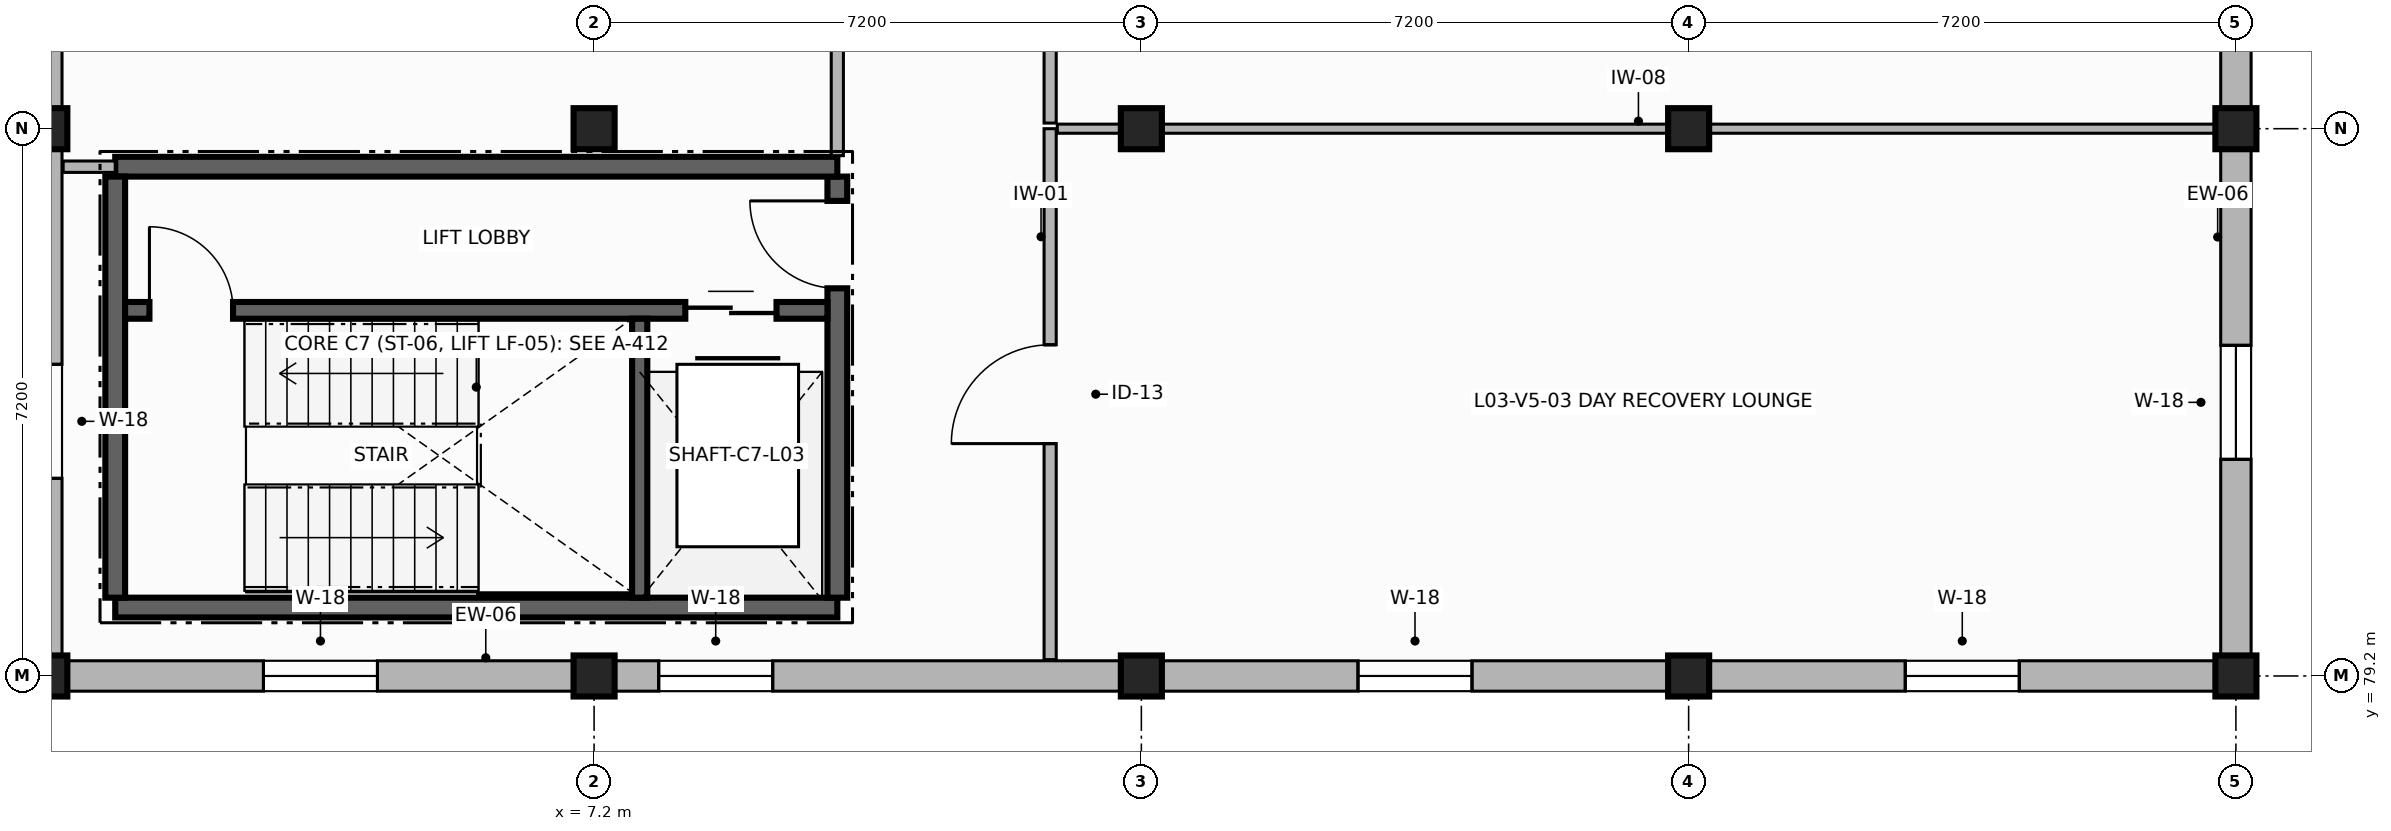
"""IFC4 building model, lengths in metres.
Left out: names, types, materials, properties, quantities, classifications, styles, units other than length and angle.
Written with IfcOpenShell. Run it as: python <this file> out.ifc"""

import sys

from ifc_helpers import new_model, si_unit, direction, frame, frame_2d, origin, origin_2d, place, context, subcontext, project, spatial, rectangle, extrude, element, fill, save


model = new_model("IFC4")
c1 = context("Model", 3, precision=1e-05, world=origin(), true_north=direction((0.0, 1.0)))
c2 = subcontext(c1, "Body", "Model", "MODEL_VIEW")
j1 = project(units=[si_unit("LENGTHUNIT", "METRE"), si_unit("PLANEANGLEUNIT", "RADIAN")], contexts=[c1])
p1 = place(None, origin())
s1 = spatial("IfcSite", under=j1, at=p1, CompositionType="ELEMENT")
p2 = place(p1, origin())
s2 = spatial("IfcBuilding", under=s1, at=p2, CompositionType="ELEMENT")
p3 = place(p2, frame((0.0, 0.0, 12.3)))
s3 = spatial("IfcBuildingStorey", under=s2, at=p3, CompositionType="ELEMENT", Elevation=12.3)
for number, where, z_axis, x_axis in (
    (1, (0.0, 79.2, 0.0), (0.0, 0.0, 1.0), (1.0, 0.0, 0.0)),
    (2, (0.0, 86.4, 0.0), (0.0, 0.0, 1.0), (1.0, 0.0, 0.0)),
    (3, (7.2, 79.2, 0.0), (0.0, 0.0, 1.0), (1.0, 0.0, 0.0)),
    (4, (7.2, 86.4, 0.0), (0.0, 0.0, 1.0), (1.0, 0.0, 0.0)),
    (5, (14.4, 79.2, 0.0), (0.0, 0.0, 1.0), (1.0, 0.0, 0.0)),
    (6, (14.4, 86.4, 0.0), (0.0, 0.0, 1.0), (1.0, 0.0, 0.0)),
    (7, (21.6, 79.2, 0.0), (0.0, 0.0, 1.0), (1.0, 0.0, 0.0)),
    (8, (21.6, 86.4, 0.0), (0.0, 0.0, 1.0), (1.0, 0.0, 0.0)),
    (9, (28.8, 79.2, 0.0), (0.0, 0.0, 1.0), (1.0, 0.0, 0.0)),
    (10, (28.8, 86.4, 0.0), (0.0, 0.0, 1.0), (1.0, 0.0, 0.0)),
):
    element("IfcColumn", number, at=place(p3, frame(where, z_axis=z_axis, x_axis=x_axis)), inside=s3, PredefinedType="COLUMN", context=c2, shape_type="SweptSolid", body=[
        extrude(rectangle(XDim=0.54, YDim=0.54, at=origin_2d()), origin(), (0.0, 0.0, 1.0), 3.39),
    ])
p4 = place(p3, frame((0.0, 79.2, 0.0), z_axis=(0.0, 0.0, 1.0), x_axis=(1.0, 0.0, 0.0)))
e11 = element("IfcWall", 11, at=p4, inside=s3, PredefinedType="SOLIDWALL", context=c2, shape_type="SweptSolid", body=[
    extrude(rectangle(XDim=7.2, YDim=0.4, at=frame_2d((3.6, 0.0))), origin(), (0.0, 0.0, 1.0), 2.72),
])
p5 = place(p4, frame((2.85, 0.0, 0.9)))
e12 = element("IfcOpeningElement", 12, at=p5, cuts=e11, PredefinedType="OPENING", context=c2, shape_type="SweptSolid", body=[
    extrude(rectangle(XDim=1.5, YDim=1.6, at=frame_2d((0.75, 0.8))), frame((0.0, 0.21, 0.0), z_axis=(0.0, -1.0, 0.0), x_axis=(1.0, 0.0, 0.0)), (0.0, 0.0, 1.0), 0.42),
])
p6 = place(p3, frame((7.2, 79.2, 0.0), z_axis=(0.0, 0.0, 1.0), x_axis=(1.0, 0.0, 0.0)))
e13 = element("IfcWall", 13, at=p6, inside=s3, PredefinedType="SOLIDWALL", context=c2, shape_type="SweptSolid", body=[
    extrude(rectangle(XDim=7.2, YDim=0.4, at=frame_2d((3.6, 0.0))), origin(), (0.0, 0.0, 1.0), 2.72),
])
p7 = place(p6, frame((0.85, 0.0, 0.9)))
e14 = element("IfcOpeningElement", 14, at=p7, cuts=e13, PredefinedType="OPENING", context=c2, shape_type="SweptSolid", body=[
    extrude(rectangle(XDim=1.5, YDim=1.6, at=frame_2d((0.75, 0.8))), frame((0.0, 0.21, 0.0), z_axis=(0.0, -1.0, 0.0), x_axis=(1.0, 0.0, 0.0)), (0.0, 0.0, 1.0), 0.42),
])
p8 = place(p3, frame((14.4, 79.2, 0.0), z_axis=(0.0, 0.0, 1.0), x_axis=(1.0, 0.0, 0.0)))
e15 = element("IfcWall", 15, at=p8, inside=s3, PredefinedType="SOLIDWALL", context=c2, shape_type="SweptSolid", body=[
    extrude(rectangle(XDim=7.2, YDim=0.4, at=frame_2d((3.6, 0.0))), origin(), (0.0, 0.0, 1.0), 2.72),
])
p9 = place(p8, frame((2.85, 0.0, 0.9)))
e16 = element("IfcOpeningElement", 16, at=p9, cuts=e15, PredefinedType="OPENING", context=c2, shape_type="SweptSolid", body=[
    extrude(rectangle(XDim=1.5, YDim=1.6, at=frame_2d((0.75, 0.8))), frame((0.0, 0.21, 0.0), z_axis=(0.0, -1.0, 0.0), x_axis=(1.0, 0.0, 0.0)), (0.0, 0.0, 1.0), 0.42),
])
p10 = place(p3, frame((21.6, 79.2, 0.0), z_axis=(0.0, 0.0, 1.0), x_axis=(1.0, 0.0, 0.0)))
e17 = element("IfcWall", 17, at=p10, inside=s3, PredefinedType="SOLIDWALL", context=c2, shape_type="SweptSolid", body=[
    extrude(rectangle(XDim=7.2, YDim=0.4, at=frame_2d((3.6, 0.0))), origin(), (0.0, 0.0, 1.0), 2.72),
])
p11 = place(p10, frame((2.85, 0.0, 0.9)))
e18 = element("IfcOpeningElement", 18, at=p11, cuts=e17, PredefinedType="OPENING", context=c2, shape_type="SweptSolid", body=[
    extrude(rectangle(XDim=1.5, YDim=1.6, at=frame_2d((0.75, 0.8))), frame((0.0, 0.21, 0.0), z_axis=(0.0, -1.0, 0.0), x_axis=(1.0, 0.0, 0.0)), (0.0, 0.0, 1.0), 0.42),
])
p12 = place(p3, frame((28.8, 79.2, 0.0), z_axis=(0.0, 0.0, 1.0), x_axis=(0.0, 1.0, 0.0)))
e19 = element("IfcWall", 19, at=p12, inside=s3, PredefinedType="SOLIDWALL", context=c2, shape_type="SweptSolid", body=[
    extrude(rectangle(XDim=7.2, YDim=0.4, at=frame_2d((3.6, 0.0))), origin(), (0.0, 0.0, 1.0), 2.72),
])
p13 = place(p12, frame((2.85, 0.0, 0.9)))
e20 = element("IfcOpeningElement", 20, at=p13, cuts=e19, PredefinedType="OPENING", context=c2, shape_type="SweptSolid", body=[
    extrude(rectangle(XDim=1.5, YDim=1.6, at=frame_2d((0.75, 0.8))), frame((0.0, 0.21, 0.0), z_axis=(0.0, -1.0, 0.0), x_axis=(1.0, 0.0, 0.0)), (0.0, 0.0, 1.0), 0.42),
])
p14 = place(p3, frame((28.8, 86.4, 0.0), z_axis=(0.0, 0.0, 1.0), x_axis=(0.0, 1.0, 0.0)))
e21 = element("IfcWall", 21, at=p14, inside=s3, PredefinedType="SOLIDWALL", context=c2, shape_type="SweptSolid", body=[
    extrude(rectangle(XDim=7.2, YDim=0.4, at=frame_2d((3.6, 0.0))), origin(), (0.0, 0.0, 1.0), 2.72),
])
p15 = place(p14, frame((2.85, 0.0, 0.9)))
e22 = element("IfcOpeningElement", 22, at=p15, cuts=e21, PredefinedType="OPENING", context=c2, shape_type="SweptSolid", body=[
    extrude(rectangle(XDim=1.5, YDim=1.6, at=frame_2d((0.75, 0.8))), frame((0.0, 0.21, 0.0), z_axis=(0.0, -1.0, 0.0), x_axis=(1.0, 0.0, 0.0)), (0.0, 0.0, 1.0), 0.42),
])
p16 = place(p3, frame((0.0, 93.6, 0.0), z_axis=(0.0, 0.0, 1.0), x_axis=(0.0, -1.0, 0.0)))
e23 = element("IfcWall", 23, at=p16, inside=s3, PredefinedType="SOLIDWALL", context=c2, shape_type="SweptSolid", body=[
    extrude(rectangle(XDim=7.2, YDim=0.4, at=frame_2d((3.6, 0.0))), origin(), (0.0, 0.0, 1.0), 2.72),
])
p17 = place(p16, frame((2.85, 0.0, 0.9)))
e24 = element("IfcOpeningElement", 24, at=p17, cuts=e23, PredefinedType="OPENING", context=c2, shape_type="SweptSolid", body=[
    extrude(rectangle(XDim=1.5, YDim=1.6, at=frame_2d((0.75, 0.8))), frame((0.0, 0.21, 0.0), z_axis=(0.0, -1.0, 0.0), x_axis=(1.0, 0.0, 0.0)), (0.0, 0.0, 1.0), 0.42),
])
p18 = place(p3, frame((0.0, 86.4, 0.0), z_axis=(0.0, 0.0, 1.0), x_axis=(0.0, -1.0, 0.0)))
e25 = element("IfcWall", 25, at=p18, inside=s3, PredefinedType="SOLIDWALL", context=c2, shape_type="SweptSolid", body=[
    extrude(rectangle(XDim=7.2, YDim=0.4, at=frame_2d((3.6, 0.0))), origin(), (0.0, 0.0, 1.0), 2.72),
])
p19 = place(p18, frame((3.1, 0.0, 0.9)))
e26 = element("IfcOpeningElement", 26, at=p19, cuts=e25, PredefinedType="OPENING", context=c2, shape_type="SweptSolid", body=[
    extrude(rectangle(XDim=1.5, YDim=1.6, at=frame_2d((0.75, 0.8))), frame((0.0, 0.21, 0.0), z_axis=(0.0, -1.0, 0.0), x_axis=(1.0, 0.0, 0.0)), (0.0, 0.0, 1.0), 0.42),
])
p20 = place(p3, frame((0.9, 80.1, 0.0), z_axis=(0.0, 0.0, 1.0), x_axis=(1.0, 0.0, 0.0)))
e27 = element("IfcWall", 27, at=p20, inside=s3, PredefinedType="SHEAR", context=c2, shape_type="SweptSolid", body=[
    extrude(rectangle(XDim=9.5, YDim=0.26, at=frame_2d((4.75, 0.0))), origin(), (0.0, 0.0, 1.0), 3.39),
])
p21 = place(p3, frame((10.4, 80.23, 0.0), z_axis=(0.0, 0.0, 1.0), x_axis=(0.0, 1.0, 0.0)))
e28 = element("IfcWall", 28, at=p21, inside=s3, PredefinedType="SHEAR", context=c2, shape_type="SweptSolid", body=[
    extrude(rectangle(XDim=5.54, YDim=0.26, at=frame_2d((2.77, 0.0))), origin(), (0.0, 0.0, 1.0), 3.39),
])
p22 = place(p21, frame((4.07, 0.0, 0.0)))
e29 = element("IfcOpeningElement", 29, at=p22, cuts=e28, PredefinedType="OPENING", context=c2, shape_type="SweptSolid", body=[
    extrude(rectangle(XDim=1.15, YDim=2.2, at=frame_2d((0.575, 1.1))), frame((0.0, 0.14, 0.0), z_axis=(0.0, -1.0, 0.0), x_axis=(1.0, 0.0, 0.0)), (0.0, 0.0, 1.0), 0.28),
])
p23 = place(p3, frame((10.4, 85.9, 0.0), z_axis=(0.0, 0.0, 1.0), x_axis=(-1.0, 0.0, 0.0)))
e30 = element("IfcWall", 30, at=p23, inside=s3, PredefinedType="SHEAR", context=c2, shape_type="SweptSolid", body=[
    extrude(rectangle(XDim=9.5, YDim=0.26, at=frame_2d((4.75, 0.0))), origin(), (0.0, 0.0, 1.0), 3.39),
])
p24 = place(p3, frame((0.9, 85.77, 0.0), z_axis=(0.0, 0.0, 1.0), x_axis=(0.0, -1.0, 0.0)))
e31 = element("IfcWall", 31, at=p24, inside=s3, PredefinedType="SHEAR", context=c2, shape_type="SweptSolid", body=[
    extrude(rectangle(XDim=5.54, YDim=0.26, at=frame_2d((2.77, 0.0))), origin(), (0.0, 0.0, 1.0), 3.39),
])
p25 = place(p3, frame((1.03, 84.01, 0.0), z_axis=(0.0, 0.0, 1.0), x_axis=(1.0, 0.0, 0.0)))
e32 = element("IfcWall", 32, at=p25, inside=s3, PredefinedType="SHEAR", context=c2, shape_type="SweptSolid", body=[
    extrude(rectangle(XDim=9.24, YDim=0.22, at=frame_2d((4.62, 0.0))), origin(), (0.0, 0.0, 1.0), 3.39),
])
p26 = place(p25, frame((0.32, 0.0, 0.0)))
e33 = element("IfcOpeningElement", 33, at=p26, cuts=e32, PredefinedType="OPENING", context=c2, shape_type="SweptSolid", body=[
    extrude(rectangle(XDim=1.1, YDim=2.15, at=frame_2d((0.55, 1.075))), frame((0.0, 0.12, 0.0), z_axis=(0.0, -1.0, 0.0), x_axis=(1.0, 0.0, 0.0)), (0.0, 0.0, 1.0), 0.24),
])
p27 = place(p25, frame((7.37, 0.0, 0.0)))
e34 = element("IfcOpeningElement", 34, at=p27, cuts=e32, PredefinedType="OPENING", context=c2, shape_type="SweptSolid", body=[
    extrude(rectangle(XDim=1.2, YDim=2.2, at=frame_2d((0.6, 1.1))), frame((0.0, 0.12, 0.0), z_axis=(0.0, -1.0, 0.0), x_axis=(1.0, 0.0, 0.0)), (0.0, 0.0, 1.0), 0.24),
])
p28 = place(p3, frame((7.8, 80.23, 0.0), z_axis=(0.0, 0.0, 1.0), x_axis=(0.0, 1.0, 0.0)))
e35 = element("IfcWall", 35, at=p28, inside=s3, PredefinedType="SHEAR", context=c2, shape_type="SweptSolid", body=[
    extrude(rectangle(XDim=3.67, YDim=0.2, at=frame_2d((1.835, 0.0))), origin(), (0.0, 0.0, 1.0), 3.39),
])
p29 = place(p3, frame((10.4, 93.511, 0.0), z_axis=(0.0, 0.0, 1.0), x_axis=(0.0, -1.0, 0.0)))
e36 = element("IfcWall", 36, at=p29, inside=s3, PredefinedType="PARTITIONING", context=c2, shape_type="SweptSolid", body=[
    extrude(rectangle(XDim=7.466, YDim=0.16, at=frame_2d((3.733, 0.0))), origin(), (0.0, 0.0, 1.0), 2.7),
])
p30 = place(p29, frame((2.864, 0.0, 0.0)))
e37 = element("IfcOpeningElement", 37, at=p30, cuts=e36, PredefinedType="OPENING", context=c2, shape_type="SweptSolid", body=[
    extrude(rectangle(XDim=1.5, YDim=2.3, at=frame_2d((0.75, 1.15))), frame((0.0, 0.09, 0.0), z_axis=(0.0, -1.0, 0.0), x_axis=(1.0, 0.0, 0.0)), (0.0, 0.0, 1.0), 0.18),
])
p31 = place(p3, frame((0.9, 85.9, 0.0), z_axis=(0.0, 0.0, 1.0), x_axis=(-1.0, 0.0, 0.0)))
e38 = element("IfcWall", 38, at=p31, inside=s3, PredefinedType="PARTITIONING", context=c2, shape_type="SweptSolid", body=[
    extrude(rectangle(XDim=0.685, YDim=0.15, at=frame_2d((0.342, 0.0))), origin(), (0.0, 0.0, 1.0), 2.7),
])
p32 = place(p3, frame((13.2, 79.415, 0.0), z_axis=(0.0, 0.0, 1.0), x_axis=(0.0, 1.0, 0.0)))
e39 = element("IfcWall", 39, at=p32, inside=s3, PredefinedType="PARTITIONING", context=c2, shape_type="SweptSolid", body=[
    extrude(rectangle(XDim=6.985, YDim=0.16, at=frame_2d((3.492, 0.0))), origin(), (0.0, 0.0, 1.0), 2.7),
])
p33 = place(p32, frame((2.842, 0.0, 0.0)))
e40 = element("IfcOpeningElement", 40, at=p33, cuts=e39, PredefinedType="OPENING", context=c2, shape_type="SweptSolid", body=[
    extrude(rectangle(XDim=1.3, YDim=2.25, at=frame_2d((0.65, 1.125))), frame((0.0, 0.09, 0.0), z_axis=(0.0, -1.0, 0.0), x_axis=(1.0, 0.0, 0.0)), (0.0, 0.0, 1.0), 0.18),
])
p34 = place(p3, frame((13.294, 86.4, 0.0), z_axis=(0.0, 0.0, 1.0), x_axis=(1.0, 0.0, 0.0)))
e41 = element("IfcWall", 41, at=p34, inside=s3, PredefinedType="PARTITIONING", context=c2, shape_type="SweptSolid", body=[
    extrude(rectangle(XDim=15.291, YDim=0.12, at=frame_2d((7.646, 0.0))), origin(), (0.0, 0.0, 1.0), 2.7),
])
p35 = place(p3, frame((13.2, 86.474, 0.0), z_axis=(0.0, 0.0, 1.0), x_axis=(0.0, 1.0, 0.0)))
e42 = element("IfcWall", 42, at=p35, inside=s3, PredefinedType="PARTITIONING", context=c2, shape_type="SweptSolid", body=[
    extrude(rectangle(XDim=14.326, YDim=0.16, at=frame_2d((7.163, 0.0))), origin(), (0.0, 0.0, 1.0), 2.7),
])
p36 = place(p35, frame((2.903, 0.0, 0.0)))
e43 = element("IfcOpeningElement", 43, at=p36, cuts=e42, PredefinedType="OPENING", context=c2, shape_type="SweptSolid", body=[
    extrude(rectangle(XDim=1.25, YDim=2.2, at=frame_2d((0.625, 1.1))), frame((0.0, 0.09, 0.0), z_axis=(0.0, -1.0, 0.0), x_axis=(1.0, 0.0, 0.0)), (0.0, 0.0, 1.0), 0.18),
])
p37 = place(p5, origin())
e44 = element("IfcWindow", 44, at=p37, inside=s3, PartitioningType="SINGLE_PANEL", PredefinedType="WINDOW", context=c2, shape_type="SweptSolid", body=[
    extrude(rectangle(XDim=1.5, YDim=1.6, at=frame_2d((0.75, 0.8))), frame((0.0, 0.03, 0.0), z_axis=(0.0, -1.0, 0.0), x_axis=(1.0, 0.0, 0.0)), (0.0, 0.0, 1.0), 0.06),
])
fill(e12, e44)
p38 = place(p7, origin())
e45 = element("IfcWindow", 45, at=p38, inside=s3, PartitioningType="SINGLE_PANEL", PredefinedType="WINDOW", context=c2, shape_type="SweptSolid", body=[
    extrude(rectangle(XDim=1.5, YDim=1.6, at=frame_2d((0.75, 0.8))), frame((0.0, 0.03, 0.0), z_axis=(0.0, -1.0, 0.0), x_axis=(1.0, 0.0, 0.0)), (0.0, 0.0, 1.0), 0.06),
])
fill(e14, e45)
p39 = place(p9, origin())
e46 = element("IfcWindow", 46, at=p39, inside=s3, PartitioningType="SINGLE_PANEL", PredefinedType="WINDOW", context=c2, shape_type="SweptSolid", body=[
    extrude(rectangle(XDim=1.5, YDim=1.6, at=frame_2d((0.75, 0.8))), frame((0.0, 0.03, 0.0), z_axis=(0.0, -1.0, 0.0), x_axis=(1.0, 0.0, 0.0)), (0.0, 0.0, 1.0), 0.06),
])
fill(e16, e46)
p40 = place(p11, origin())
e47 = element("IfcWindow", 47, at=p40, inside=s3, PartitioningType="SINGLE_PANEL", PredefinedType="WINDOW", context=c2, shape_type="SweptSolid", body=[
    extrude(rectangle(XDim=1.5, YDim=1.6, at=frame_2d((0.75, 0.8))), frame((0.0, 0.03, 0.0), z_axis=(0.0, -1.0, 0.0), x_axis=(1.0, 0.0, 0.0)), (0.0, 0.0, 1.0), 0.06),
])
fill(e18, e47)
p41 = place(p13, origin())
e48 = element("IfcWindow", 48, at=p41, inside=s3, PartitioningType="SINGLE_PANEL", PredefinedType="WINDOW", context=c2, shape_type="SweptSolid", body=[
    extrude(rectangle(XDim=1.5, YDim=1.6, at=frame_2d((0.75, 0.8))), frame((0.0, 0.03, 0.0), z_axis=(0.0, -1.0, 0.0), x_axis=(1.0, 0.0, 0.0)), (0.0, 0.0, 1.0), 0.06),
])
fill(e20, e48)
p42 = place(p26, origin())
e49 = element("IfcDoor", 49, at=p42, inside=s3, OperationType="SINGLE_SWING_LEFT", PredefinedType="DOOR", context=c2, shape_type="SweptSolid", body=[
    extrude(rectangle(XDim=1.1, YDim=2.15, at=frame_2d((0.55, 1.075))), frame((0.0, 0.025, 0.0), z_axis=(0.0, -1.0, 0.0), x_axis=(1.0, 0.0, 0.0)), (0.0, 0.0, 1.0), 0.05),
])
fill(e33, e49)
p43 = place(p27, origin())
e50 = element("IfcDoor", 50, at=p43, inside=s3, OperationType="DOUBLE_DOOR_SLIDING", PredefinedType="DOOR", context=c2, shape_type="SweptSolid", body=[
    extrude(rectangle(XDim=1.2, YDim=2.2, at=frame_2d((0.6, 1.1))), frame((0.0, 0.025, 0.0), z_axis=(0.0, -1.0, 0.0), x_axis=(1.0, 0.0, 0.0)), (0.0, 0.0, 1.0), 0.05),
])
fill(e34, e50)
p44 = place(p22, origin())
e51 = element("IfcDoor", 51, at=p44, inside=s3, OperationType="SINGLE_SWING_RIGHT", PredefinedType="DOOR", context=c2, shape_type="SweptSolid", body=[
    extrude(rectangle(XDim=1.15, YDim=2.2, at=frame_2d((0.575, 1.1))), frame((0.0, 0.025, 0.0), z_axis=(0.0, -1.0, 0.0), x_axis=(1.0, 0.0, 0.0)), (0.0, 0.0, 1.0), 0.05),
])
fill(e29, e51)
p45 = place(p33, origin())
e52 = element("IfcDoor", 52, at=p45, inside=s3, OperationType="SINGLE_SWING_LEFT", PredefinedType="DOOR", context=c2, shape_type="SweptSolid", body=[
    extrude(rectangle(XDim=1.3, YDim=2.25, at=frame_2d((0.65, 1.125))), frame((0.0, 0.025, 0.0), z_axis=(0.0, -1.0, 0.0), x_axis=(1.0, 0.0, 0.0)), (0.0, 0.0, 1.0), 0.05),
])
fill(e40, e52)
save(model, sys.argv[1])
